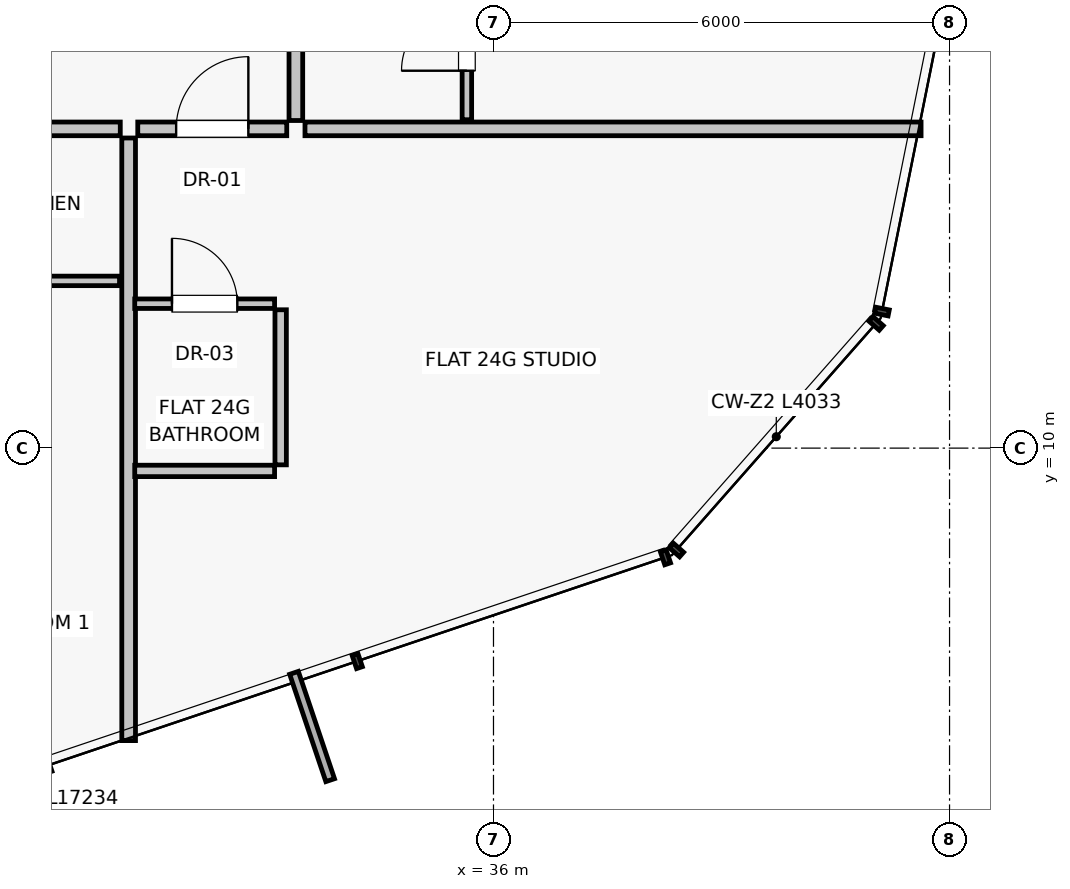
"""IFC4 building model, lengths in metres.
Left out: names, types, materials, properties, quantities, classifications, styles, units other than length and angle.
Written with IfcOpenShell. Run it as: python <this file> out.ifc"""

import sys

from ifc_helpers import new_model, si_unit, direction, frame, frame_2d, origin, place, context, subcontext, project, spatial, rectangle, extrude, source, transform, mapped, element, fill, save


model = new_model("IFC4")
c1 = context("Model", 3, precision=1e-05, world=origin(), true_north=direction((0.0, 1.0)))
c2 = subcontext(c1, "Body", "Model", "MODEL_VIEW")
j1 = project(units=[si_unit("LENGTHUNIT", "METRE"), si_unit("PLANEANGLEUNIT", "RADIAN")], contexts=[c1])
p1 = place(None, origin())
s1 = spatial("IfcSite", under=j1, at=p1, CompositionType="ELEMENT")
p2 = place(p1, origin())
s2 = spatial("IfcBuilding", under=s1, at=p2, CompositionType="ELEMENT")
p3 = place(p2, frame((0.0, 0.0, 89.45)))
s3 = spatial("IfcBuildingStorey", under=s2, at=p3, CompositionType="ELEMENT", Elevation=89.45)
p4 = place(p3, frame((31.2, 14.08, 0.0), z_axis=(0.0, 0.0, 1.0), x_axis=(0.0, -1.0, 0.0)))
e1 = element("IfcWall", 1, at=p4, inside=s3, PredefinedType="PARTITIONING", context=c2, shape_type="SweptSolid", body=[
    extrude(rectangle(XDim=7.928, YDim=0.18, at=frame_2d((3.964, 0.0))), origin(), (0.0, 0.0, 1.0), 3.0),
])
p5 = place(p3, frame((21.23, 14.2, 0.0), z_axis=(0.0, 0.0, 1.0), x_axis=(1.0, 0.0, 0.0)))
e2 = element("IfcWall", 2, at=p5, inside=s3, PredefinedType="PARTITIONING", context=c2, shape_type="SweptSolid", body=[
    extrude(rectangle(XDim=9.86, YDim=0.18, at=frame_2d((4.93, 0.0))), origin(), (0.0, 0.0, 1.0), 3.0),
])
p6 = place(p5, frame((3.276, 0.0, 0.0)))
e3 = element("IfcOpeningElement", 3, at=p6, cuts=e2, PredefinedType="OPENING", context=c2, shape_type="SweptSolid", body=[
    extrude(rectangle(XDim=0.95, YDim=2.02, at=frame_2d((0.475, 1.01))), frame((0.0, 0.1, 0.0), z_axis=(0.0, -1.0, 0.0), x_axis=(1.0, 0.0, 0.0)), (0.0, 0.0, 1.0), 0.2),
])
p7 = place(p3, frame((26.692, 12.2, 0.0), z_axis=(0.0, 0.0, 1.0), x_axis=(1.0, 0.0, 0.0)))
e4 = element("IfcWall", 4, at=p7, inside=s3, PredefinedType="PARTITIONING", context=c2, shape_type="SweptSolid", body=[
    extrude(rectangle(XDim=4.388, YDim=0.125, at=frame_2d((2.194, 0.0))), origin(), (0.0, 0.0, 1.0), 2.58),
])
p8 = place(p3, frame((33.52, 14.2, 0.0), z_axis=(0.0, 0.0, 1.0), x_axis=(1.0, 0.0, 0.0)))
e5 = element("IfcWall", 5, at=p8, inside=s3, PredefinedType="PARTITIONING", context=c2, shape_type="SweptSolid", body=[
    extrude(rectangle(XDim=8.105, YDim=0.18, at=frame_2d((4.053, 0.0))), origin(), (0.0, 0.0, 1.0), 3.0),
])
p9 = place(p3, frame((33.4, 14.31, 0.0), z_axis=(0.0, 0.0, 1.0), x_axis=(0.0, 1.0, 0.0)))
e6 = element("IfcWall", 6, at=p9, inside=s3, PredefinedType="PARTITIONING", context=c2, shape_type="SweptSolid", body=[
    extrude(rectangle(XDim=6.332, YDim=0.18, at=frame_2d((3.166, 0.0))), origin(), (0.0, 0.0, 1.0), 3.0),
])
p10 = place(p9, frame((3.887, 0.0, 0.0)))
e7 = element("IfcOpeningElement", 7, at=p10, cuts=e6, PredefinedType="OPENING", context=c2, shape_type="SweptSolid", body=[
    extrude(rectangle(XDim=0.95, YDim=2.02, at=frame_2d((0.475, 1.01))), frame((0.0, 0.1, 0.0), z_axis=(0.0, -1.0, 0.0), x_axis=(1.0, 0.0, 0.0)), (0.0, 0.0, 1.0), 0.2),
])
p11 = place(p3, frame((35.65, 14.32, 0.0), z_axis=(0.0, 0.0, 1.0), x_axis=(0.0, 1.0, 0.0)))
e8 = element("IfcWall", 8, at=p11, inside=s3, PredefinedType="PARTITIONING", context=c2, shape_type="SweptSolid", body=[
    extrude(rectangle(XDim=2.15, YDim=0.125, at=frame_2d((1.075, 0.0))), origin(), (0.0, 0.0, 1.0), 3.0),
])
p12 = place(p11, frame((0.645, 0.0, 0.0)))
e9 = element("IfcOpeningElement", 9, at=p12, cuts=e8, PredefinedType="OPENING", context=c2, shape_type="SweptSolid", body=[
    extrude(rectangle(XDim=0.86, YDim=2.01, at=frame_2d((0.43, 1.005))), frame((0.0, 0.073, 0.0), z_axis=(0.0, -1.0, 0.0), x_axis=(1.0, 0.0, 0.0)), (0.0, 0.0, 1.0), 0.145),
])
p13 = place(p3, frame((31.32, 14.2, 0.0), z_axis=(0.0, 0.0, 1.0), x_axis=(1.0, 0.0, 0.0)))
e10 = element("IfcWall", 10, at=p13, inside=s3, PredefinedType="PARTITIONING", context=c2, shape_type="SweptSolid", body=[
    extrude(rectangle(XDim=1.96, YDim=0.18, at=frame_2d((0.98, 0.0))), origin(), (0.0, 0.0, 1.0), 3.0),
])
p14 = place(p13, frame((0.505, 0.0, 0.0)))
e11 = element("IfcOpeningElement", 11, at=p14, cuts=e10, PredefinedType="OPENING", context=c2, shape_type="SweptSolid", body=[
    extrude(rectangle(XDim=0.95, YDim=2.02, at=frame_2d((0.475, 1.01))), frame((0.0, 0.1, 0.0), z_axis=(0.0, -1.0, 0.0), x_axis=(1.0, 0.0, 0.0)), (0.0, 0.0, 1.0), 0.2),
])
p15 = place(p3, frame((31.28, 11.9, 0.0), z_axis=(0.0, 0.0, 1.0), x_axis=(1.0, 0.0, 0.0)))
e12 = element("IfcWall", 12, at=p15, inside=s3, PredefinedType="PARTITIONING", context=c2, shape_type="SweptSolid", body=[
    extrude(rectangle(XDim=1.84, YDim=0.125, at=frame_2d((0.92, 0.0))), origin(), (0.0, 0.0, 1.0), 3.0),
])
p16 = place(p15, frame((0.49, 0.0, 0.0)))
e13 = element("IfcOpeningElement", 13, at=p16, cuts=e12, PredefinedType="OPENING", context=c2, shape_type="SweptSolid", body=[
    extrude(rectangle(XDim=0.86, YDim=2.01, at=frame_2d((0.43, 1.005))), frame((0.0, 0.073, 0.0), z_axis=(0.0, -1.0, 0.0), x_axis=(1.0, 0.0, 0.0)), (0.0, 0.0, 1.0), 0.145),
])
p17 = place(p3, frame((31.28, 9.7, 0.0), z_axis=(0.0, 0.0, 1.0), x_axis=(1.0, 0.0, 0.0)))
e14 = element("IfcWall", 14, at=p17, inside=s3, PredefinedType="PARTITIONING", context=c2, shape_type="SweptSolid", body=[
    extrude(rectangle(XDim=1.84, YDim=0.15, at=frame_2d((0.92, 0.0))), origin(), (0.0, 0.0, 1.0), 3.0),
])
p18 = place(p3, frame((33.2, 9.78, 0.0), z_axis=(0.0, 0.0, 1.0), x_axis=(0.0, 1.0, 0.0)))
e15 = element("IfcWall", 15, at=p18, inside=s3, PredefinedType="PARTITIONING", context=c2, shape_type="SweptSolid", body=[
    extrude(rectangle(XDim=2.04, YDim=0.15, at=frame_2d((1.02, 0.0))), origin(), (0.0, 0.0, 1.0), 3.0),
])
m1 = source(origin(), c2, "Body", "SweptSolid", [
    extrude(rectangle(XDim=0.86, YDim=2.01, at=frame_2d((0.43, 1.005))), frame((0.0, 0.025, 0.0), z_axis=(0.0, -1.0, 0.0), x_axis=(1.0, 0.0, 0.0)), (0.0, 0.0, 1.0), 0.05),
])
p19 = place(p12, origin())
e16 = element("IfcDoor", 16, at=p19, inside=s3, OperationType="SINGLE_SWING_LEFT", PredefinedType="DOOR", context=c2, shape_type="MappedRepresentation", body=[
    mapped(m1, transform((0.0, 0.0, 0.0), scale=1.0)),
])
fill(e9, e16)
m2 = source(origin(), c2, "Body", "SweptSolid", [
    extrude(rectangle(XDim=0.95, YDim=2.02, at=frame_2d((0.475, 1.01))), frame((0.0, 0.025, 0.0), z_axis=(0.0, -1.0, 0.0), x_axis=(1.0, 0.0, 0.0)), (0.0, 0.0, 1.0), 0.05),
])
p20 = place(p14, origin())
e17 = element("IfcDoor", 17, at=p20, inside=s3, OperationType="SINGLE_SWING_RIGHT", PredefinedType="DOOR", context=c2, shape_type="MappedRepresentation", body=[
    mapped(m2, transform((0.0, 0.0, 0.0), scale=1.0)),
])
fill(e11, e17)
p21 = place(p16, origin())
e18 = element("IfcDoor", 18, at=p21, inside=s3, OperationType="SINGLE_SWING_LEFT", PredefinedType="DOOR", context=c2, shape_type="MappedRepresentation", body=[
    mapped(m1, transform((0.0, 0.0, 0.0), scale=1.0)),
])
fill(e13, e18)
save(model, sys.argv[1])
